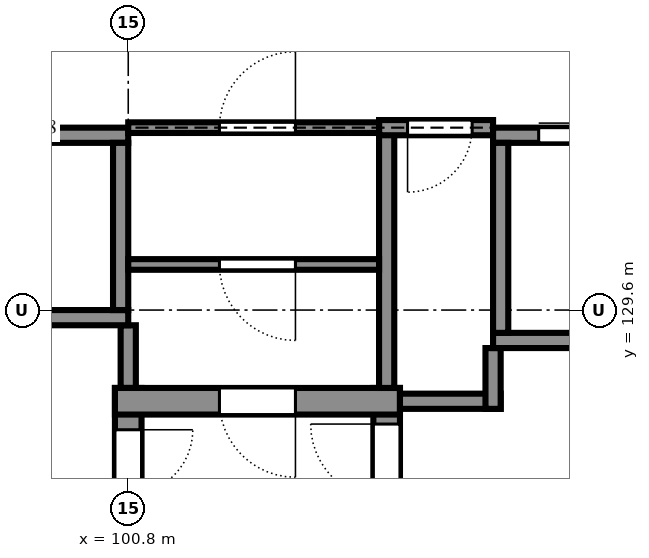
"""IFC4 building model, lengths in metres.
Left out: names, types, materials, properties, quantities, classifications, styles, units other than length and angle.
Written with IfcOpenShell. Run it as: python <this file> out.ifc"""

import sys

from ifc_helpers import new_model, si_unit, direction, frame, frame_2d, origin, place, context, subcontext, project, spatial, rectangle, extrude, element, fill, save


model = new_model("IFC4")
c1 = context("Model", 3, precision=1e-05, world=origin(), true_north=direction((0.0, 1.0)))
c2 = subcontext(c1, "Body", "Model", "MODEL_VIEW")
j1 = project(units=[si_unit("LENGTHUNIT", "METRE"), si_unit("PLANEANGLEUNIT", "RADIAN")], contexts=[c1])
p1 = place(None, origin())
s1 = spatial("IfcSite", under=j1, at=p1, CompositionType="ELEMENT")
p2 = place(p1, origin())
s2 = spatial("IfcBuilding", under=s1, at=p2, CompositionType="ELEMENT")
p3 = place(p2, frame((0.0, 0.0, 3.6)))
s3 = spatial("IfcBuildingStorey", under=s2, at=p3, CompositionType="ELEMENT", Elevation=3.6)
p4 = place(p3, frame((104.2, 125.1, 0.0), z_axis=(0.0, 0.0, 1.0), x_axis=(0.0, 1.0, 0.0)))
e1 = element("IfcWall", 1, at=p4, inside=s3, PredefinedType="SHEAR", context=c2, shape_type="SweptSolid", body=[
    extrude(rectangle(XDim=3.475, YDim=0.35, at=frame_2d((1.737, 0.0))), origin(), (0.0, 0.0, 1.0), 3.6),
])
p5 = place(p4, frame((2.0, 0.0, 0.0)))
e2 = element("IfcOpeningElement", 2, at=p5, cuts=e1, PredefinedType="OPENING", context=c2, shape_type="SweptSolid", body=[
    extrude(rectangle(XDim=1.0, YDim=2.1, at=frame_2d((0.5, 1.05))), frame((0.0, 0.185, 0.0), z_axis=(0.0, -1.0, 0.0), x_axis=(1.0, 0.0, 0.0)), (0.0, 0.0, 1.0), 0.37),
])
p6 = place(p3, frame((100.8, 128.575, 0.0), z_axis=(0.0, 0.0, 1.0), x_axis=(0.0, -1.0, 0.0)))
e3 = element("IfcWall", 3, at=p6, inside=s3, PredefinedType="SHEAR", context=c2, shape_type="SweptSolid", body=[
    extrude(rectangle(XDim=6.35, YDim=0.35, at=frame_2d((3.175, 0.0))), origin(), (0.0, 0.0, 1.0), 3.6),
])
p7 = place(p6, frame((0.55, 0.0, 0.0)))
e4 = element("IfcOpeningElement", 4, at=p7, cuts=e3, PredefinedType="OPENING", context=c2, shape_type="SweptSolid", body=[
    extrude(rectangle(XDim=0.85, YDim=2.1, at=frame_2d((0.425, 1.05))), frame((0.0, 0.185, 0.0), z_axis=(0.0, -1.0, 0.0), x_axis=(1.0, 0.0, 0.0)), (0.0, 0.0, 1.0), 0.37),
])
p8 = place(p3, frame((100.8, 128.575, 0.0), z_axis=(0.0, 0.0, 1.0), x_axis=(0.0, 1.0, 0.0)))
e5 = element("IfcWall", 5, at=p8, inside=s3, PredefinedType="SHEAR", context=c2, shape_type="SweptSolid", body=[
    extrude(rectangle(XDim=0.825, YDim=0.2, at=frame_2d((0.413, 0.0))), origin(), (0.0, 0.0, 1.0), 3.6),
])
p9 = place(p3, frame((104.375, 128.4, 0.0), z_axis=(0.0, 0.0, 1.0), x_axis=(-1.0, 0.0, 0.0)))
e6 = element("IfcWall", 6, at=p9, inside=s3, PredefinedType="SHEAR", context=c2, shape_type="SweptSolid", body=[
    extrude(rectangle(XDim=3.75, YDim=0.35, at=frame_2d((1.875, 0.0))), origin(), (0.0, 0.0, 1.0), 3.6),
])
p10 = place(p9, frame((1.375, 0.0, 0.0)))
e7 = element("IfcOpeningElement", 7, at=p10, cuts=e6, PredefinedType="OPENING", context=c2, shape_type="SweptSolid", body=[
    extrude(rectangle(XDim=1.0, YDim=2.1, at=frame_2d((0.5, 1.05))), frame((0.0, 0.185, 0.0), z_axis=(0.0, -1.0, 0.0), x_axis=(1.0, 0.0, 0.0)), (0.0, 0.0, 1.0), 0.37),
])
p11 = place(p3, frame((104.375, 128.4, 0.0), z_axis=(0.0, 0.0, 1.0), x_axis=(1.0, 0.0, 0.0)))
e8 = element("IfcWall", 8, at=p11, inside=s3, PredefinedType="SHEAR", context=c2, shape_type="SweptSolid", body=[
    extrude(rectangle(XDim=1.325, YDim=0.2, at=frame_2d((0.663, 0.0))), origin(), (0.0, 0.0, 1.0), 3.6),
])
p12 = place(p3, frame((105.6, 128.3, 0.0), z_axis=(0.0, 0.0, 1.0), x_axis=(0.0, 1.0, 0.0)))
e9 = element("IfcWall", 9, at=p12, inside=s3, PredefinedType="SHEAR", context=c2, shape_type="SweptSolid", body=[
    extrude(rectangle(XDim=0.8, YDim=0.2, at=frame_2d((0.4, 0.0))), origin(), (0.0, 0.0, 1.0), 3.6),
])
p13 = place(p3, frame((104.2, 132.1, 0.0), z_axis=(0.0, 0.0, 1.0), x_axis=(0.0, -1.0, 0.0)))
e10 = element("IfcWall", 10, at=p13, inside=s3, PredefinedType="SHEAR", context=c2, shape_type="SweptSolid", body=[
    extrude(rectangle(XDim=3.525, YDim=0.2, at=frame_2d((1.763, 0.0))), origin(), (0.0, 0.0, 1.0), 3.6),
])
p14 = place(p3, frame((105.6, 132.0, 0.0), z_axis=(0.0, 0.0, 1.0), x_axis=(-1.0, 0.0, 0.0)))
e11 = element("IfcWall", 11, at=p14, inside=s3, PredefinedType="SHEAR", context=c2, shape_type="SweptSolid", body=[
    extrude(rectangle(XDim=1.5, YDim=0.2, at=frame_2d((0.75, 0.0))), origin(), (0.0, 0.0, 1.0), 3.6),
])
p15 = place(p14, frame((0.275, 0.0, 0.0)))
e12 = element("IfcOpeningElement", 12, at=p15, cuts=e11, PredefinedType="OPENING", context=c2, shape_type="SweptSolid", body=[
    extrude(rectangle(XDim=0.85, YDim=2.1, at=frame_2d((0.425, 1.05))), frame((0.0, 0.11, 0.0), z_axis=(0.0, -1.0, 0.0), x_axis=(1.0, 0.0, 0.0)), (0.0, 0.0, 1.0), 0.22),
])
for number, where, z_axis, x_axis in (
    (13, (98.4, 129.5, 0.0), (0.0, 0.0, 1.0), (1.0, 0.0, 0.0)),
    (14, (98.4, 131.9, 0.0), (0.0, 0.0, 1.0), (1.0, 0.0, 0.0)),
):
    element("IfcWall", number, at=place(p3, frame(where, z_axis=z_axis, x_axis=x_axis)), inside=s3, PredefinedType="SHEAR", context=c2, shape_type="SweptSolid", body=[
        extrude(rectangle(XDim=2.4, YDim=0.2, at=frame_2d((1.2, 0.0))), origin(), (0.0, 0.0, 1.0), 3.6),
    ])
p16 = place(p3, frame((100.7, 129.6, 0.0), z_axis=(0.0, 0.0, 1.0), x_axis=(0.0, 1.0, 0.0)))
e15 = element("IfcWall", 15, at=p16, inside=s3, PredefinedType="SHEAR", context=c2, shape_type="SweptSolid", body=[
    extrude(rectangle(XDim=2.2, YDim=0.2, at=frame_2d((1.1, 0.0))), origin(), (0.0, 0.0, 1.0), 3.6),
])
p17 = place(p3, frame((105.6, 129.2, 0.0), z_axis=(0.0, 0.0, 1.0), x_axis=(1.0, 0.0, 0.0)))
e16 = element("IfcWall", 16, at=p17, inside=s3, PredefinedType="SHEAR", context=c2, shape_type="SweptSolid", body=[
    extrude(rectangle(XDim=2.4, YDim=0.2, at=frame_2d((1.2, 0.0))), origin(), (0.0, 0.0, 1.0), 3.6),
])
p18 = place(p3, frame((105.6, 131.9, 0.0), z_axis=(0.0, 0.0, 1.0), x_axis=(1.0, 0.0, 0.0)))
e17 = element("IfcWall", 17, at=p18, inside=s3, PredefinedType="SHEAR", context=c2, shape_type="SweptSolid", body=[
    extrude(rectangle(XDim=2.4, YDim=0.2, at=frame_2d((1.2, 0.0))), origin(), (0.0, 0.0, 1.0), 3.6),
])
p19 = place(p18, frame((0.6, 0.0, 0.0)))
e18 = element("IfcOpeningElement", 18, at=p19, cuts=e17, PredefinedType="OPENING", context=c2, shape_type="SweptSolid", body=[
    extrude(rectangle(XDim=1.2, YDim=2.1, at=frame_2d((0.6, 1.05))), frame((0.0, 0.11, 0.0), z_axis=(0.0, -1.0, 0.0), x_axis=(1.0, 0.0, 0.0)), (0.0, 0.0, 1.0), 0.22),
])
p20 = place(p3, frame((105.7, 129.3, 0.0), z_axis=(0.0, 0.0, 1.0), x_axis=(0.0, 1.0, 0.0)))
e19 = element("IfcWall", 19, at=p20, inside=s3, PredefinedType="SHEAR", context=c2, shape_type="SweptSolid", body=[
    extrude(rectangle(XDim=2.5, YDim=0.2, at=frame_2d((1.25, 0.0))), origin(), (0.0, 0.0, 1.0), 3.6),
])
p21 = place(p3, frame((100.8, 130.2, 0.0), z_axis=(0.0, 0.0, 1.0), x_axis=(1.0, 0.0, 0.0)))
e20 = element("IfcWall", 20, at=p21, inside=s3, PredefinedType="PARTITIONING", context=c2, shape_type="SweptSolid", body=[
    extrude(rectangle(XDim=3.3, YDim=0.14, at=frame_2d((1.65, 0.0))), origin(), (0.0, 0.0, 1.0), 3.42),
])
p22 = place(p21, frame((1.2, 0.0, 0.0)))
e21 = element("IfcOpeningElement", 21, at=p22, cuts=e20, PredefinedType="OPENING", context=c2, shape_type="SweptSolid", body=[
    extrude(rectangle(XDim=1.0, YDim=2.1, at=frame_2d((0.5, 1.05))), frame((0.0, 0.08, 0.0), z_axis=(0.0, -1.0, 0.0), x_axis=(1.0, 0.0, 0.0)), (0.0, 0.0, 1.0), 0.16),
])
p23 = place(p3, frame((100.8, 132.0, 0.0), z_axis=(0.0, 0.0, 1.0), x_axis=(1.0, 0.0, 0.0)))
e22 = element("IfcWall", 22, at=p23, inside=s3, PredefinedType="PARTITIONING", context=c2, shape_type="SweptSolid", body=[
    extrude(rectangle(XDim=3.3, YDim=0.14, at=frame_2d((1.65, 0.0))), origin(), (0.0, 0.0, 1.0), 3.42),
])
p24 = place(p23, frame((1.2, 0.0, 0.0)))
e23 = element("IfcOpeningElement", 23, at=p24, cuts=e22, PredefinedType="OPENING", context=c2, shape_type="SweptSolid", body=[
    extrude(rectangle(XDim=1.0, YDim=2.1, at=frame_2d((0.5, 1.05))), frame((0.0, 0.08, 0.0), z_axis=(0.0, -1.0, 0.0), x_axis=(1.0, 0.0, 0.0)), (0.0, 0.0, 1.0), 0.16),
])
p25 = place(p19, origin())
e24 = element("IfcDoor", 24, at=p25, inside=s3, OperationType="SLIDING_TO_LEFT", PredefinedType="DOOR", context=c2, shape_type="SweptSolid", body=[
    extrude(rectangle(XDim=1.2, YDim=2.1, at=frame_2d((0.6, 1.05))), frame((0.0, 0.025, 0.0), z_axis=(0.0, -1.0, 0.0), x_axis=(1.0, 0.0, 0.0)), (0.0, 0.0, 1.0), 0.05),
])
fill(e18, e24)
p26 = place(p22, frame((1.0, 0.0, 0.0), z_axis=(0.0, 0.0, 1.0), x_axis=(-1.0, 0.0, 0.0)))
e25 = element("IfcDoor", 25, at=p26, inside=s3, OperationType="SINGLE_SWING_RIGHT", PredefinedType="DOOR", context=c2, shape_type="SweptSolid", body=[
    extrude(rectangle(XDim=1.0, YDim=2.1, at=frame_2d((0.5, 1.05))), frame((0.0, 0.025, 0.0), z_axis=(0.0, -1.0, 0.0), x_axis=(1.0, 0.0, 0.0)), (0.0, 0.0, 1.0), 0.05),
])
fill(e21, e25)
p27 = place(p24, origin())
e26 = element("IfcDoor", 26, at=p27, inside=s3, OperationType="SINGLE_SWING_LEFT", PredefinedType="DOOR", context=c2, shape_type="SweptSolid", body=[
    extrude(rectangle(XDim=1.0, YDim=2.1, at=frame_2d((0.5, 1.05))), frame((0.0, 0.025, 0.0), z_axis=(0.0, -1.0, 0.0), x_axis=(1.0, 0.0, 0.0)), (0.0, 0.0, 1.0), 0.05),
])
fill(e23, e26)
p28 = place(p10, origin())
e27 = element("IfcDoor", 27, at=p28, inside=s3, OperationType="SINGLE_SWING_RIGHT", PredefinedType="DOOR", context=c2, shape_type="SweptSolid", body=[
    extrude(rectangle(XDim=1.0, YDim=2.1, at=frame_2d((0.5, 1.05))), frame((0.0, 0.025, 0.0), z_axis=(0.0, -1.0, 0.0), x_axis=(1.0, 0.0, 0.0)), (0.0, 0.0, 1.0), 0.05),
])
fill(e7, e27)
p29 = place(p7, origin())
e28 = element("IfcDoor", 28, at=p29, inside=s3, OperationType="SINGLE_SWING_RIGHT", PredefinedType="DOOR", context=c2, shape_type="SweptSolid", body=[
    extrude(rectangle(XDim=0.85, YDim=2.1, at=frame_2d((0.425, 1.05))), frame((0.0, 0.025, 0.0), z_axis=(0.0, -1.0, 0.0), x_axis=(1.0, 0.0, 0.0)), (0.0, 0.0, 1.0), 0.05),
])
fill(e4, e28)
p30 = place(p5, origin())
e29 = element("IfcDoor", 29, at=p30, inside=s3, OperationType="SINGLE_SWING_LEFT", PredefinedType="DOOR", context=c2, shape_type="SweptSolid", body=[
    extrude(rectangle(XDim=1.0, YDim=2.1, at=frame_2d((0.5, 1.05))), frame((0.0, 0.025, 0.0), z_axis=(0.0, -1.0, 0.0), x_axis=(1.0, 0.0, 0.0)), (0.0, 0.0, 1.0), 0.05),
])
fill(e2, e29)
p31 = place(p15, origin())
e30 = element("IfcDoor", 30, at=p31, inside=s3, OperationType="SINGLE_SWING_LEFT", PredefinedType="DOOR", context=c2, shape_type="SweptSolid", body=[
    extrude(rectangle(XDim=0.85, YDim=2.1, at=frame_2d((0.425, 1.05))), frame((0.0, 0.025, 0.0), z_axis=(0.0, -1.0, 0.0), x_axis=(1.0, 0.0, 0.0)), (0.0, 0.0, 1.0), 0.05),
])
fill(e12, e30)
save(model, sys.argv[1])
